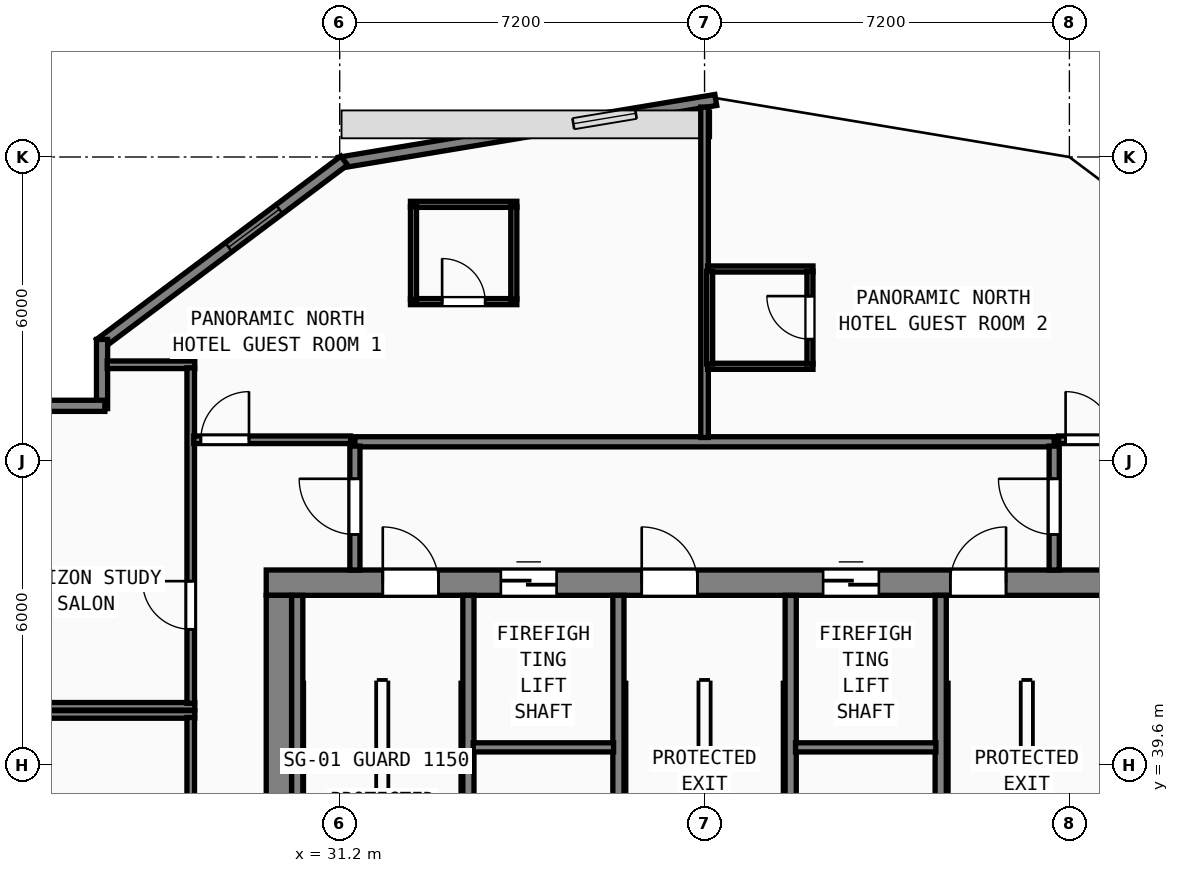
"""IFC4 building model, lengths in metres.
Left out: names, types, materials, properties, quantities, classifications, styles, units other than length and angle.
Written with IfcOpenShell. Run it as: python <this file> out.ifc"""

import sys

from ifc_helpers import new_model, si_unit, direction, frame, frame_2d, origin, origin_2d, place, context, subcontext, project, spatial, rectangle, hollow_rectangle, extrude, element, fill, save


model = new_model("IFC4")
c1 = context("Model", 3, precision=1e-05, world=origin(), true_north=direction((0.0, 1.0)))
c2 = subcontext(c1, "Body", "Model", "MODEL_VIEW")
j1 = project(units=[si_unit("LENGTHUNIT", "METRE"), si_unit("PLANEANGLEUNIT", "RADIAN")], contexts=[c1])
p1 = place(None, origin())
s1 = spatial("IfcSite", under=j1, at=p1, CompositionType="ELEMENT")
p2 = place(p1, origin())
s2 = spatial("IfcBuilding", under=s1, at=p2, CompositionType="ELEMENT")
p3 = place(p2, frame((0.0, 0.0, 282.2)))
s3 = spatial("IfcBuildingStorey", under=s2, at=p3, CompositionType="ELEMENT", Elevation=282.2)
p4 = place(p3, frame((29.75, 43.2, 0.0), z_axis=(0.0, 0.0, 1.0), x_axis=(1.0, 0.0, 0.0)))
e1 = element("IfcWall", 1, at=p4, inside=s3, PredefinedType="SHEAR", context=c2, shape_type="SweptSolid", body=[
    extrude(rectangle(XDim=17.3, YDim=0.5, at=frame_2d((8.65, 0.0))), origin(), (0.0, 0.0, 1.0), 3.72),
])
p5 = place(p4, frame((2.3, 0.0, 0.0)))
e2 = element("IfcOpeningElement", 2, at=p5, cuts=e1, PredefinedType="OPENING", context=c2, shape_type="SweptSolid", body=[
    extrude(rectangle(XDim=1.1, YDim=2.15, at=frame_2d((0.55, 1.075))), frame((0.0, 0.26, 0.0), z_axis=(0.0, -1.0, 0.0), x_axis=(1.0, 0.0, 0.0)), (0.0, 0.0, 1.0), 0.52),
])
p6 = place(p4, frame((7.41, 0.0, 0.0)))
e3 = element("IfcOpeningElement", 3, at=p6, cuts=e1, PredefinedType="OPENING", context=c2, shape_type="SweptSolid", body=[
    extrude(rectangle(XDim=1.1, YDim=2.15, at=frame_2d((0.55, 1.075))), frame((0.0, 0.26, 0.0), z_axis=(0.0, -1.0, 0.0), x_axis=(1.0, 0.0, 0.0)), (0.0, 0.0, 1.0), 0.52),
])
p7 = place(p4, frame((13.5, 0.0, 0.0)))
e4 = element("IfcOpeningElement", 4, at=p7, cuts=e1, PredefinedType="OPENING", context=c2, shape_type="SweptSolid", body=[
    extrude(rectangle(XDim=1.1, YDim=2.15, at=frame_2d((0.55, 1.075))), frame((0.0, 0.26, 0.0), z_axis=(0.0, -1.0, 0.0), x_axis=(1.0, 0.0, 0.0)), (0.0, 0.0, 1.0), 0.52),
])
p8 = place(p4, frame((4.63, 0.0, 0.0)))
e5 = element("IfcOpeningElement", 5, at=p8, cuts=e1, PredefinedType="OPENING", context=c2, shape_type="SweptSolid", body=[
    extrude(rectangle(XDim=1.1, YDim=2.2, at=frame_2d((0.55, 1.1))), frame((0.0, 0.26, 0.0), z_axis=(0.0, -1.0, 0.0), x_axis=(1.0, 0.0, 0.0)), (0.0, 0.0, 1.0), 0.52),
])
p9 = place(p4, frame((10.99, 0.0, 0.0)))
e6 = element("IfcOpeningElement", 6, at=p9, cuts=e1, PredefinedType="OPENING", context=c2, shape_type="SweptSolid", body=[
    extrude(rectangle(XDim=1.1, YDim=2.2, at=frame_2d((0.55, 1.1))), frame((0.0, 0.26, 0.0), z_axis=(0.0, -1.0, 0.0), x_axis=(1.0, 0.0, 0.0)), (0.0, 0.0, 1.0), 0.52),
])
p10 = place(p3, frame((30.0, 32.8, 0.0), z_axis=(0.0, 0.0, 1.0), x_axis=(0.0, 1.0, 0.0)))
e7 = element("IfcWall", 7, at=p10, inside=s3, PredefinedType="SHEAR", context=c2, shape_type="SweptSolid", body=[
    extrude(rectangle(XDim=10.15, YDim=0.5, at=frame_2d((5.075, 0.0))), origin(), (0.0, 0.0, 1.0), 3.72),
])
for number, where, z_axis, x_axis in (
    (8, (30.362, 35.39, 0.0), (0.0, 0.0, 1.0), (0.0, 1.0, 0.0)),
    (9, (33.74, 35.39, 0.0), (0.0, 0.0, 1.0), (0.0, 1.0, 0.0)),
    (10, (36.7, 35.39, 0.0), (0.0, 0.0, 1.0), (0.0, 1.0, 0.0)),
    (11, (40.1, 35.39, 0.0), (0.0, 0.0, 1.0), (0.0, 1.0, 0.0)),
    (12, (43.06, 35.39, 0.0), (0.0, 0.0, 1.0), (0.0, 1.0, 0.0)),
):
    element("IfcWall", number, at=place(p3, frame(where, z_axis=z_axis, x_axis=x_axis)), inside=s3, PredefinedType="SHEAR", context=c2, shape_type="SweptSolid", body=[
        extrude(rectangle(XDim=7.56, YDim=0.22, at=frame_2d((3.78, 0.0))), origin(), (0.0, 0.0, 1.0), 3.72),
    ])
for number, where, z_axis, x_axis in (
    (13, (31.2, 50.4, 0.0), (0.0, 0.0, 1.0), (1.0, 0.0, 0.0)),
    (14, (45.6, 50.4, 0.0), (0.0, 0.0, 1.0), (1.0, 0.0, 0.0)),
):
    element("IfcColumn", number, at=place(p3, frame(where, z_axis=z_axis, x_axis=x_axis)), inside=s3, PredefinedType="COLUMN", context=c2, shape_type="SweptSolid", body=[
        extrude(hollow_rectangle(XDim=0.7, YDim=0.7, WallThickness=0.026, at=origin_2d()), origin(), (0.0, 0.0, 1.0), 3.9),
    ])
p11 = place(p3, frame((38.4, 50.4, 0.0), z_axis=(0.0, 0.0, 1.0), x_axis=(1.0, 0.0, 0.0)))
e15 = element("IfcColumn", 15, at=p11, inside=s3, PredefinedType="COLUMN", context=c2, shape_type="SweptSolid", body=[
    extrude(hollow_rectangle(XDim=0.6, YDim=0.6, WallThickness=0.024, at=origin_2d()), origin(), (0.0, 0.0, 1.0), 3.9),
])
p12 = place(p3, frame((38.622, 52.726, 0.0), z_axis=(0.0, 0.0, 1.0), x_axis=(-0.986390420428, -0.164420006349, 0.0)))
e16 = element("IfcWall", 16, at=p12, inside=s3, PredefinedType="SOLIDWALL", context=c2, shape_type="SweptSolid", body=[
    extrude(rectangle(XDim=7.534, YDim=0.22, at=frame_2d((3.767, 0.0))), origin(), (0.0, 0.0, 1.0), 3.72),
])
p13 = place(p12, frame((1.6, 0.0, 0.85)))
e17 = element("IfcOpeningElement", 17, at=p13, cuts=e16, PredefinedType="OPENING", context=c2, shape_type="SweptSolid", body=[
    extrude(rectangle(XDim=1.25, YDim=1.95, at=frame_2d((0.625, 0.975))), frame((0.0, 0.12, 0.0), z_axis=(0.0, -1.0, 0.0), x_axis=(1.0, 0.0, 0.0)), (0.0, 0.0, 1.0), 0.24),
])
p14 = place(p3, frame((31.289, 51.529, 0.0), z_axis=(0.0, 0.0, 1.0), x_axis=(-0.800014580093, -0.599980559383, 0.0)))
e18 = element("IfcWall", 18, at=p14, inside=s3, PredefinedType="SOLIDWALL", context=c2, shape_type="SweptSolid", body=[
    extrude(rectangle(XDim=6.028, YDim=0.22, at=frame_2d((3.014, 0.0))), origin(), (0.0, 0.0, 1.0), 3.72),
])
p15 = place(p14, frame((1.6, 0.0, 0.85)))
e19 = element("IfcOpeningElement", 19, at=p15, cuts=e18, PredefinedType="OPENING", context=c2, shape_type="SweptSolid", body=[
    extrude(rectangle(XDim=1.25, YDim=1.95, at=frame_2d((0.625, 0.975))), frame((0.0, 0.12, 0.0), z_axis=(0.0, -1.0, 0.0), x_axis=(1.0, 0.0, 0.0)), (0.0, 0.0, 1.0), 0.24),
])
p16 = place(p3, frame((26.51, 48.0, 0.0), z_axis=(0.0, 0.0, 1.0), x_axis=(0.0, -1.0, 0.0)))
e20 = element("IfcWall", 20, at=p16, inside=s3, PredefinedType="SOLIDWALL", context=c2, shape_type="SweptSolid", body=[
    extrude(rectangle(XDim=1.365, YDim=0.22, at=frame_2d((0.683, 0.0))), origin(), (0.0, 0.0, 1.0), 3.72),
])
p17 = place(p3, frame((26.565, 46.69, 0.0), z_axis=(0.0, 0.0, 1.0), x_axis=(-1.0, 0.0, 0.0)))
e21 = element("IfcWall", 21, at=p17, inside=s3, PredefinedType="SOLIDWALL", context=c2, shape_type="SweptSolid", body=[
    extrude(rectangle(XDim=1.31, YDim=0.22, at=frame_2d((0.655, 0.0))), origin(), (0.0, 0.0, 1.0), 3.72),
])
p18 = place(p3, frame((31.5, 45.98, 0.0), z_axis=(0.0, 0.0, 1.0), x_axis=(1.0, 0.0, 0.0)))
e22 = element("IfcWall", 22, at=p18, inside=s3, PredefinedType="SOLIDWALL", context=c2, shape_type="SweptSolid", body=[
    extrude(rectangle(XDim=13.8, YDim=0.2, at=frame_2d((6.9, 0.0))), origin(), (0.0, 0.0, 1.0), 3.72),
])
p19 = place(p3, frame((31.5, 43.45, 0.0), z_axis=(0.0, 0.0, 1.0), x_axis=(0.0, 1.0, 0.0)))
e23 = element("IfcWall", 23, at=p19, inside=s3, PredefinedType="SOLIDWALL", context=c2, shape_type="SweptSolid", body=[
    extrude(rectangle(XDim=2.445, YDim=0.2, at=frame_2d((1.223, 0.0))), origin(), (0.0, 0.0, 1.0), 3.72),
])
p20 = place(p19, frame((1.8, 0.0, 0.0), z_axis=(0.0, 0.0, 1.0), x_axis=(-1.0, 0.0, 0.0)))
e24 = element("IfcOpeningElement", 24, at=p20, cuts=e23, PredefinedType="OPENING", context=c2, shape_type="SweptSolid", body=[
    extrude(rectangle(XDim=1.1, YDim=2.15, at=frame_2d((0.55, 1.075))), frame((0.0, 0.11, 0.0), z_axis=(0.0, -1.0, 0.0), x_axis=(1.0, 0.0, 0.0)), (0.0, 0.0, 1.0), 0.22),
])
p21 = place(p3, frame((45.3, 43.45, 0.0), z_axis=(0.0, 0.0, 1.0), x_axis=(0.0, 1.0, 0.0)))
e25 = element("IfcWall", 25, at=p21, inside=s3, PredefinedType="SOLIDWALL", context=c2, shape_type="SweptSolid", body=[
    extrude(rectangle(XDim=2.445, YDim=0.2, at=frame_2d((1.223, 0.0))), origin(), (0.0, 0.0, 1.0), 3.72),
])
p22 = place(p21, frame((0.7, 0.0, 0.0)))
e26 = element("IfcOpeningElement", 26, at=p22, cuts=e25, PredefinedType="OPENING", context=c2, shape_type="SweptSolid", body=[
    extrude(rectangle(XDim=1.1, YDim=2.15, at=frame_2d((0.55, 1.075))), frame((0.0, 0.11, 0.0), z_axis=(0.0, -1.0, 0.0), x_axis=(1.0, 0.0, 0.0)), (0.0, 0.0, 1.0), 0.22),
])
for number, where, z_axis, x_axis in (
    (27, (33.835, 39.95, 0.0), (0.0, 0.0, 1.0), (1.0, 0.0, 0.0)),
    (28, (40.195, 39.95, 0.0), (0.0, 0.0, 1.0), (1.0, 0.0, 0.0)),
):
    element("IfcWall", number, at=place(p3, frame(where, z_axis=z_axis, x_axis=x_axis)), inside=s3, PredefinedType="SOLIDWALL", context=c2, shape_type="SweptSolid", body=[
        extrude(rectangle(XDim=2.77, YDim=0.18, at=frame_2d((1.385, 0.0))), origin(), (0.0, 0.0, 1.0), 3.72),
    ])
p23 = place(p3, frame((24.212, 40.6, 0.0), z_axis=(0.0, 0.0, 1.0), x_axis=(1.0, 0.0, 0.0)))
e29 = element("IfcWall", 29, at=p23, inside=s3, PredefinedType="PARTITIONING", context=c2, shape_type="SweptSolid", body=[
    extrude(rectangle(XDim=4.128, YDim=0.15, at=frame_2d((2.064, 0.0))), origin(), (0.0, 0.0, 1.0), 3.72),
])
p24 = place(p3, frame((28.26, 36.52, 0.0), z_axis=(0.0, 0.0, 1.0), x_axis=(0.0, 1.0, 0.0)))
e30 = element("IfcWall", 30, at=p24, inside=s3, PredefinedType="PARTITIONING", context=c2, shape_type="SweptSolid", body=[
    extrude(rectangle(XDim=4.02, YDim=0.15, at=frame_2d((2.01, 0.0))), origin(), (0.0, 0.0, 1.0), 3.72),
])
p25 = place(p24, frame((2.01, 0.0, 0.0), z_axis=(0.0, 0.0, 1.0), x_axis=(-1.0, 0.0, 0.0)))
e31 = element("IfcOpeningElement", 31, at=p25, cuts=e30, PredefinedType="OPENING", context=c2, shape_type="SweptSolid", body=[
    extrude(rectangle(XDim=0.95, YDim=2.12, at=frame_2d((0.475, 1.06))), frame((0.0, 0.085, 0.0), z_axis=(0.0, -1.0, 0.0), x_axis=(1.0, 0.0, 0.0)), (0.0, 0.0, 1.0), 0.17),
])
p26 = place(p3, frame((26.612, 47.5, 0.0), z_axis=(0.0, 0.0, 1.0), x_axis=(1.0, 0.0, 0.0)))
e32 = element("IfcWall", 32, at=p26, inside=s3, PredefinedType="PARTITIONING", context=c2, shape_type="SweptSolid", body=[
    extrude(rectangle(XDim=1.728, YDim=0.15, at=frame_2d((0.864, 0.0))), origin(), (0.0, 0.0, 1.0), 3.72),
])
p27 = place(p3, frame((24.212, 40.76, 0.0), z_axis=(0.0, 0.0, 1.0), x_axis=(1.0, 0.0, 0.0)))
e33 = element("IfcWall", 33, at=p27, inside=s3, PredefinedType="PARTITIONING", context=c2, shape_type="SweptSolid", body=[
    extrude(rectangle(XDim=4.128, YDim=0.15, at=frame_2d((2.064, 0.0))), origin(), (0.0, 0.0, 1.0), 3.72),
])
p28 = place(p3, frame((28.26, 40.82, 0.0), z_axis=(0.0, 0.0, 1.0), x_axis=(0.0, 1.0, 0.0)))
e34 = element("IfcWall", 34, at=p28, inside=s3, PredefinedType="PARTITIONING", context=c2, shape_type="SweptSolid", body=[
    extrude(rectangle(XDim=6.62, YDim=0.15, at=frame_2d((3.31, 0.0))), origin(), (0.0, 0.0, 1.0), 3.72),
])
p29 = place(p28, frame((2.41, 0.0, 0.0), z_axis=(0.0, 0.0, 1.0), x_axis=(-1.0, 0.0, 0.0)))
e35 = element("IfcOpeningElement", 35, at=p29, cuts=e34, PredefinedType="OPENING", context=c2, shape_type="SweptSolid", body=[
    extrude(rectangle(XDim=0.95, YDim=2.12, at=frame_2d((0.475, 1.06))), frame((0.0, 0.085, 0.0), z_axis=(0.0, -1.0, 0.0), x_axis=(1.0, 0.0, 0.0)), (0.0, 0.0, 1.0), 0.17),
])
p30 = place(p3, frame((28.32, 46.02, 0.0), z_axis=(0.0, 0.0, 1.0), x_axis=(1.0, 0.0, 0.0)))
e36 = element("IfcWall", 36, at=p30, inside=s3, PredefinedType="PARTITIONING", context=c2, shape_type="SweptSolid", body=[
    extrude(rectangle(XDim=3.095, YDim=0.15, at=frame_2d((1.547, 0.0))), origin(), (0.0, 0.0, 1.0), 3.72),
])
p31 = place(p30, frame((0.14, 0.0, 0.0)))
e37 = element("IfcOpeningElement", 37, at=p31, cuts=e36, PredefinedType="OPENING", context=c2, shape_type="SweptSolid", body=[
    extrude(rectangle(XDim=0.95, YDim=2.15, at=frame_2d((0.475, 1.075))), frame((0.0, 0.085, 0.0), z_axis=(0.0, -1.0, 0.0), x_axis=(1.0, 0.0, 0.0)), (0.0, 0.0, 1.0), 0.17),
])
p32 = place(p3, frame((38.4, 46.065, 0.0), z_axis=(0.0, 0.0, 1.0), x_axis=(0.0, 1.0, 0.0)))
e38 = element("IfcWall", 38, at=p32, inside=s3, PredefinedType="PARTITIONING", context=c2, shape_type="SweptSolid", body=[
    extrude(rectangle(XDim=6.52, YDim=0.15, at=frame_2d((3.26, 0.0))), origin(), (0.0, 0.0, 1.0), 3.72),
])
p33 = place(p3, frame((32.596, 50.666, 0.0), z_axis=(0.0, 0.0, 1.0), x_axis=(1.0, 0.0, 0.0)))
e39 = element("IfcWall", 39, at=p33, inside=s3, PredefinedType="PARTITIONING", context=c2, shape_type="SweptSolid", body=[
    extrude(rectangle(XDim=2.1, YDim=0.12, at=frame_2d((1.05, 0.0))), origin(), (0.0, 0.0, 1.0), 3.72),
])
p34 = place(p3, frame((32.596, 48.746, 0.0), z_axis=(0.0, 0.0, 1.0), x_axis=(1.0, 0.0, 0.0)))
e40 = element("IfcWall", 40, at=p34, inside=s3, PredefinedType="PARTITIONING", context=c2, shape_type="SweptSolid", body=[
    extrude(rectangle(XDim=2.1, YDim=0.12, at=frame_2d((1.05, 0.0))), origin(), (0.0, 0.0, 1.0), 3.72),
])
p35 = place(p34, frame((0.625, 0.0, 0.0)))
e41 = element("IfcOpeningElement", 41, at=p35, cuts=e40, PredefinedType="OPENING", context=c2, shape_type="SweptSolid", body=[
    extrude(rectangle(XDim=0.85, YDim=2.1, at=frame_2d((0.425, 1.05))), frame((0.0, 0.07, 0.0), z_axis=(0.0, -1.0, 0.0), x_axis=(1.0, 0.0, 0.0)), (0.0, 0.0, 1.0), 0.14),
])
for number, where, z_axis, x_axis in (
    (42, (32.656, 48.791, 0.0), (0.0, 0.0, 1.0), (0.0, 1.0, 0.0)),
    (43, (34.636, 48.791, 0.0), (0.0, 0.0, 1.0), (0.0, 1.0, 0.0)),
):
    element("IfcWall", number, at=place(p3, frame(where, z_axis=z_axis, x_axis=x_axis)), inside=s3, PredefinedType="PARTITIONING", context=c2, shape_type="SweptSolid", body=[
        extrude(rectangle(XDim=1.83, YDim=0.12, at=frame_2d((0.915, 0.0))), origin(), (0.0, 0.0, 1.0), 3.72),
    ])
p36 = place(p3, frame((45.385, 46.02, 0.0), z_axis=(0.0, 0.0, 1.0), x_axis=(1.0, 0.0, 0.0)))
e44 = element("IfcWall", 44, at=p36, inside=s3, PredefinedType="PARTITIONING", context=c2, shape_type="SweptSolid", body=[
    extrude(rectangle(XDim=3.095, YDim=0.15, at=frame_2d((1.547, 0.0))), origin(), (0.0, 0.0, 1.0), 3.72),
])
p37 = place(p36, frame((0.14, 0.0, 0.0)))
e45 = element("IfcOpeningElement", 45, at=p37, cuts=e44, PredefinedType="OPENING", context=c2, shape_type="SweptSolid", body=[
    extrude(rectangle(XDim=0.95, YDim=2.15, at=frame_2d((0.475, 1.075))), frame((0.0, 0.085, 0.0), z_axis=(0.0, -1.0, 0.0), x_axis=(1.0, 0.0, 0.0)), (0.0, 0.0, 1.0), 0.17),
])
for number, where, z_axis, x_axis in (
    (46, (38.46, 49.39, 0.0), (0.0, 0.0, 1.0), (1.0, 0.0, 0.0)),
    (47, (38.46, 47.47, 0.0), (0.0, 0.0, 1.0), (1.0, 0.0, 0.0)),
):
    element("IfcWall", number, at=place(p3, frame(where, z_axis=z_axis, x_axis=x_axis)), inside=s3, PredefinedType="PARTITIONING", context=c2, shape_type="SweptSolid", body=[
        extrude(rectangle(XDim=2.08, YDim=0.12, at=frame_2d((1.04, 0.0))), origin(), (0.0, 0.0, 1.0), 3.72),
    ])
p38 = place(p3, frame((38.5, 47.515, 0.0), z_axis=(0.0, 0.0, 1.0), x_axis=(0.0, 1.0, 0.0)))
e48 = element("IfcWall", 48, at=p38, inside=s3, PredefinedType="PARTITIONING", context=c2, shape_type="SweptSolid", body=[
    extrude(rectangle(XDim=1.83, YDim=0.12, at=frame_2d((0.915, 0.0))), origin(), (0.0, 0.0, 1.0), 3.72),
])
p39 = place(p3, frame((40.48, 47.515, 0.0), z_axis=(0.0, 0.0, 1.0), x_axis=(0.0, 1.0, 0.0)))
e49 = element("IfcWall", 49, at=p39, inside=s3, PredefinedType="PARTITIONING", context=c2, shape_type="SweptSolid", body=[
    extrude(rectangle(XDim=1.83, YDim=0.12, at=frame_2d((0.915, 0.0))), origin(), (0.0, 0.0, 1.0), 3.72),
])
p40 = place(p39, frame((0.49, 0.0, 0.0)))
e50 = element("IfcOpeningElement", 50, at=p40, cuts=e49, PredefinedType="OPENING", context=c2, shape_type="SweptSolid", body=[
    extrude(rectangle(XDim=0.85, YDim=2.1, at=frame_2d((0.425, 1.05))), frame((0.0, 0.07, 0.0), z_axis=(0.0, -1.0, 0.0), x_axis=(1.0, 0.0, 0.0)), (0.0, 0.0, 1.0), 0.14),
])
p41 = place(p13, origin())
e51 = element("IfcWindow", 51, at=p41, inside=s3, PartitioningType="SINGLE_PANEL", PredefinedType="WINDOW", context=c2, shape_type="SweptSolid", body=[
    extrude(rectangle(XDim=1.25, YDim=1.95, at=frame_2d((0.625, 0.975))), frame((0.0, 0.03, 0.0), z_axis=(0.0, -1.0, 0.0), x_axis=(1.0, 0.0, 0.0)), (0.0, 0.0, 1.0), 0.06),
])
fill(e17, e51)
p42 = place(p15, origin())
e52 = element("IfcWindow", 52, at=p42, inside=s3, PartitioningType="SINGLE_PANEL", PredefinedType="WINDOW", context=c2, shape_type="SweptSolid", body=[
    extrude(rectangle(XDim=1.25, YDim=1.95, at=frame_2d((0.625, 0.975))), frame((0.0, 0.03, 0.0), z_axis=(0.0, -1.0, 0.0), x_axis=(1.0, 0.0, 0.0)), (0.0, 0.0, 1.0), 0.06),
])
fill(e19, e52)
p43 = place(p5, origin())
e53 = element("IfcDoor", 53, at=p43, inside=s3, OperationType="SINGLE_SWING_LEFT", PredefinedType="DOOR", context=c2, shape_type="SweptSolid", body=[
    extrude(rectangle(XDim=1.1, YDim=2.15, at=frame_2d((0.55, 1.075))), frame((0.0, 0.185, 0.0), z_axis=(0.0, -1.0, 0.0), x_axis=(1.0, 0.0, 0.0)), (0.0, 0.0, 1.0), 0.05),
])
fill(e2, e53)
p44 = place(p6, origin())
e54 = element("IfcDoor", 54, at=p44, inside=s3, OperationType="SINGLE_SWING_LEFT", PredefinedType="DOOR", context=c2, shape_type="SweptSolid", body=[
    extrude(rectangle(XDim=1.1, YDim=2.15, at=frame_2d((0.55, 1.075))), frame((0.0, 0.185, 0.0), z_axis=(0.0, -1.0, 0.0), x_axis=(1.0, 0.0, 0.0)), (0.0, 0.0, 1.0), 0.05),
])
fill(e3, e54)
p45 = place(p7, origin())
e55 = element("IfcDoor", 55, at=p45, inside=s3, OperationType="SINGLE_SWING_RIGHT", PredefinedType="DOOR", context=c2, shape_type="SweptSolid", body=[
    extrude(rectangle(XDim=1.1, YDim=2.15, at=frame_2d((0.55, 1.075))), frame((0.0, 0.185, 0.0), z_axis=(0.0, -1.0, 0.0), x_axis=(1.0, 0.0, 0.0)), (0.0, 0.0, 1.0), 0.05),
])
fill(e4, e55)
p46 = place(p20, origin())
e56 = element("IfcDoor", 56, at=p46, inside=s3, OperationType="SINGLE_SWING_LEFT", PredefinedType="DOOR", context=c2, shape_type="SweptSolid", body=[
    extrude(rectangle(XDim=1.1, YDim=2.15, at=frame_2d((0.55, 1.075))), frame((0.0, 0.025, 0.0), z_axis=(0.0, -1.0, 0.0), x_axis=(1.0, 0.0, 0.0)), (0.0, 0.0, 1.0), 0.05),
])
fill(e24, e56)
p47 = place(p22, origin())
e57 = element("IfcDoor", 57, at=p47, inside=s3, OperationType="SINGLE_SWING_RIGHT", PredefinedType="DOOR", context=c2, shape_type="SweptSolid", body=[
    extrude(rectangle(XDim=1.1, YDim=2.15, at=frame_2d((0.55, 1.075))), frame((0.0, 0.025, 0.0), z_axis=(0.0, -1.0, 0.0), x_axis=(1.0, 0.0, 0.0)), (0.0, 0.0, 1.0), 0.05),
])
fill(e26, e57)
p48 = place(p8, origin())
e58 = element("IfcDoor", 58, at=p48, inside=s3, OperationType="SLIDING_TO_LEFT", PredefinedType="DOOR", context=c2, shape_type="SweptSolid", body=[
    extrude(rectangle(XDim=1.1, YDim=2.2, at=frame_2d((0.55, 1.1))), frame((0.0, 0.185, 0.0), z_axis=(0.0, -1.0, 0.0), x_axis=(1.0, 0.0, 0.0)), (0.0, 0.0, 1.0), 0.05),
])
fill(e5, e58)
p49 = place(p9, origin())
e59 = element("IfcDoor", 59, at=p49, inside=s3, OperationType="SLIDING_TO_LEFT", PredefinedType="DOOR", context=c2, shape_type="SweptSolid", body=[
    extrude(rectangle(XDim=1.1, YDim=2.2, at=frame_2d((0.55, 1.1))), frame((0.0, 0.185, 0.0), z_axis=(0.0, -1.0, 0.0), x_axis=(1.0, 0.0, 0.0)), (0.0, 0.0, 1.0), 0.05),
])
fill(e6, e59)
p50 = place(p29, origin())
e60 = element("IfcDoor", 60, at=p50, inside=s3, OperationType="SINGLE_SWING_LEFT", PredefinedType="DOOR", context=c2, shape_type="SweptSolid", body=[
    extrude(rectangle(XDim=0.95, YDim=2.12, at=frame_2d((0.475, 1.06))), frame((0.0, 0.025, 0.0), z_axis=(0.0, -1.0, 0.0), x_axis=(1.0, 0.0, 0.0)), (0.0, 0.0, 1.0), 0.05),
])
fill(e35, e60)
p51 = place(p31, origin())
e61 = element("IfcDoor", 61, at=p51, inside=s3, OperationType="SINGLE_SWING_RIGHT", PredefinedType="DOOR", context=c2, shape_type="SweptSolid", body=[
    extrude(rectangle(XDim=0.95, YDim=2.15, at=frame_2d((0.475, 1.075))), frame((0.0, 0.025, 0.0), z_axis=(0.0, -1.0, 0.0), x_axis=(1.0, 0.0, 0.0)), (0.0, 0.0, 1.0), 0.05),
])
fill(e37, e61)
p52 = place(p35, origin())
e62 = element("IfcDoor", 62, at=p52, inside=s3, OperationType="SINGLE_SWING_LEFT", PredefinedType="DOOR", context=c2, shape_type="SweptSolid", body=[
    extrude(rectangle(XDim=0.85, YDim=2.1, at=frame_2d((0.425, 1.05))), frame((0.0, 0.025, 0.0), z_axis=(0.0, -1.0, 0.0), x_axis=(1.0, 0.0, 0.0)), (0.0, 0.0, 1.0), 0.05),
])
fill(e41, e62)
p53 = place(p37, origin())
e63 = element("IfcDoor", 63, at=p53, inside=s3, OperationType="SINGLE_SWING_LEFT", PredefinedType="DOOR", context=c2, shape_type="SweptSolid", body=[
    extrude(rectangle(XDim=0.95, YDim=2.15, at=frame_2d((0.475, 1.075))), frame((0.0, 0.025, 0.0), z_axis=(0.0, -1.0, 0.0), x_axis=(1.0, 0.0, 0.0)), (0.0, 0.0, 1.0), 0.05),
])
fill(e45, e63)
p54 = place(p40, origin())
e64 = element("IfcDoor", 64, at=p54, inside=s3, OperationType="SINGLE_SWING_RIGHT", PredefinedType="DOOR", context=c2, shape_type="SweptSolid", body=[
    extrude(rectangle(XDim=0.85, YDim=2.1, at=frame_2d((0.425, 1.05))), frame((0.0, 0.025, 0.0), z_axis=(0.0, -1.0, 0.0), x_axis=(1.0, 0.0, 0.0)), (0.0, 0.0, 1.0), 0.05),
])
fill(e50, e64)
save(model, sys.argv[1])
